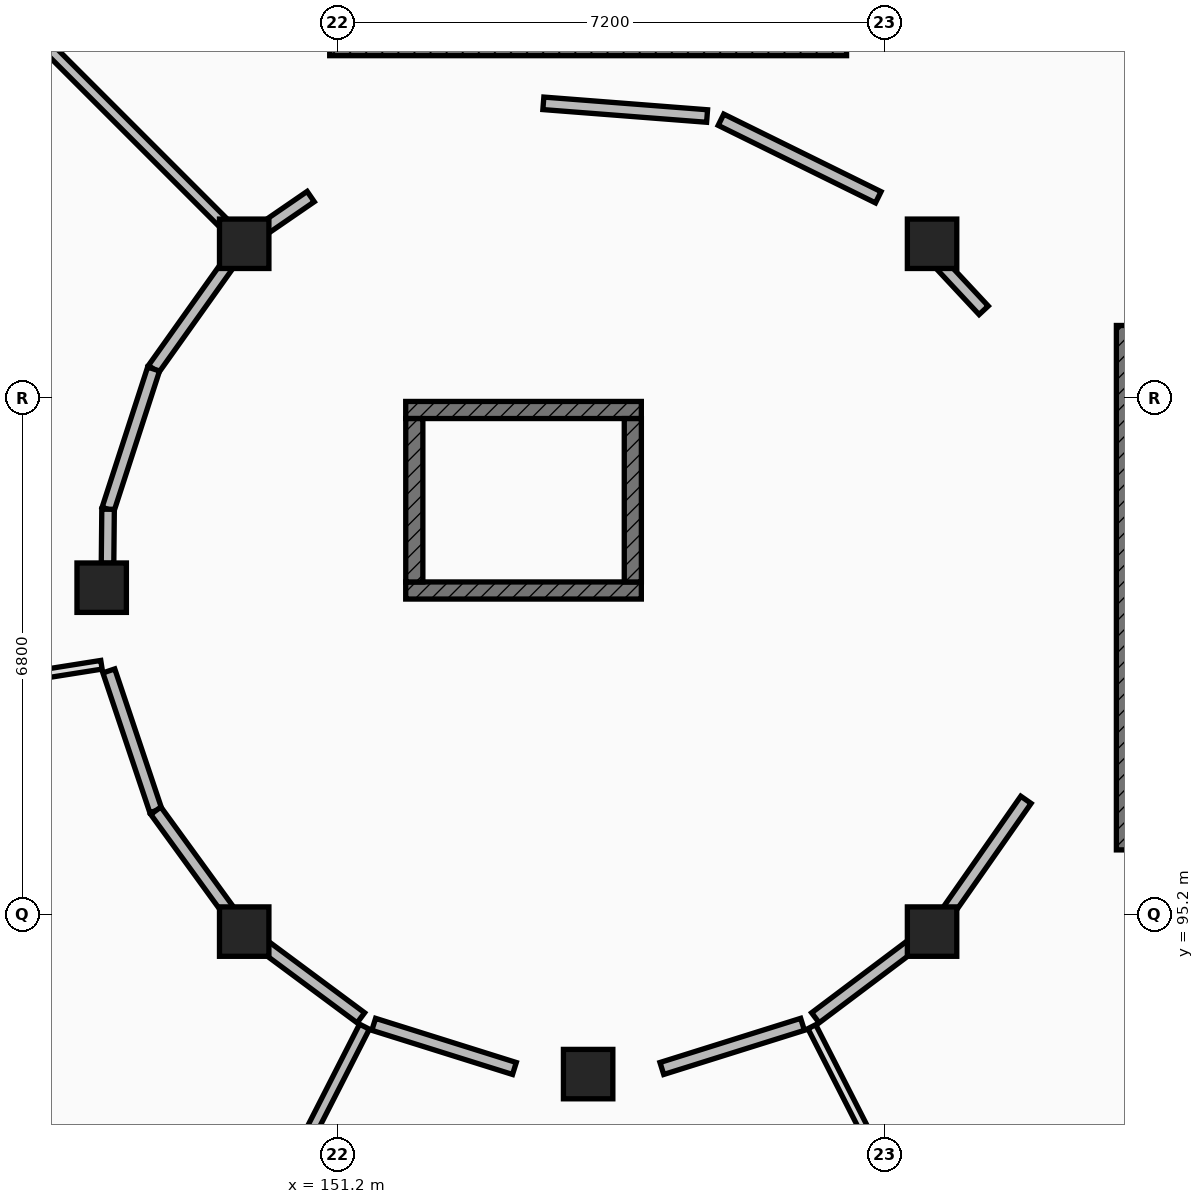
"""IFC4 building model, lengths in metres.
Left out: names, types, materials, properties, quantities, classifications, styles, units other than length and angle.
Written with IfcOpenShell. Run it as: python <this file> out.ifc"""

import sys

from ifc_helpers import new_model, si_unit, direction, frame, frame_2d, origin, origin_2d, place, context, subcontext, project, spatial, rectangle, extrude, element, fill, save


model = new_model("IFC4")
c1 = context("Model", 3, precision=1e-05, world=origin(), true_north=direction((0.0, 1.0)))
c2 = subcontext(c1, "Body", "Model", "MODEL_VIEW")
j1 = project(units=[si_unit("LENGTHUNIT", "METRE"), si_unit("PLANEANGLEUNIT", "RADIAN")], contexts=[c1])
p1 = place(None, origin())
s1 = spatial("IfcSite", under=j1, at=p1, CompositionType="ELEMENT")
p2 = place(p1, origin())
s2 = spatial("IfcBuilding", under=s1, at=p2, CompositionType="ELEMENT")
p3 = place(p2, frame((0.0, 0.0, -4.55)))
s3 = spatial("IfcBuildingStorey", under=s2, at=p3, CompositionType="ELEMENT", Elevation=-4.55)
for number, where, z_axis, x_axis in (
    (1, (159.025, 104.025, 0.0), (0.0, 0.0, 1.0), (1.0, 0.0, 0.0)),
    (2, (149.975, 104.025, 0.0), (0.0, 0.0, 1.0), (1.0, 0.0, 0.0)),
    (3, (148.1, 99.5, 0.0), (0.0, 0.0, 1.0), (1.0, 0.0, 0.0)),
    (4, (149.975, 94.975, 0.0), (0.0, 0.0, 1.0), (1.0, 0.0, 0.0)),
    (5, (154.5, 93.1, 0.0), (0.0, 0.0, 1.0), (1.0, 0.0, 0.0)),
    (6, (159.025, 94.975, 0.0), (0.0, 0.0, 1.0), (1.0, 0.0, 0.0)),
):
    element("IfcColumn", number, at=place(p3, frame(where, z_axis=z_axis, x_axis=x_axis)), inside=s3, PredefinedType="COLUMN", context=c2, shape_type="SweptSolid", body=[
        extrude(rectangle(XDim=0.65, YDim=0.65, at=origin_2d()), origin(), (0.0, 0.0, 1.0), 4.55),
    ])
p4 = place(p3, frame((161.575, 102.95, 0.0), z_axis=(0.0, 0.0, 1.0), x_axis=(0.0, -1.0, 0.0)))
e7 = element("IfcWall", 7, at=p4, inside=s3, PredefinedType="SHEAR", context=c2, shape_type="SweptSolid", body=[
    extrude(rectangle(XDim=6.9, YDim=0.25, at=frame_2d((3.45, 0.0))), origin(), (0.0, 0.0, 1.0), 4.148),
])
p5 = place(p4, frame((0.43, 0.0, 0.0)))
e8 = element("IfcOpeningElement", 8, at=p5, cuts=e7, PredefinedType="OPENING", context=c2, shape_type="SweptSolid", body=[
    extrude(rectangle(XDim=1.1, YDim=2.15, at=frame_2d((0.55, 1.075))), frame((0.0, 0.135, 0.0), z_axis=(0.0, -1.0, 0.0), x_axis=(1.0, 0.0, 0.0)), (0.0, 0.0, 1.0), 0.27),
])
p6 = place(p3, frame((151.1, 106.6, 0.0), z_axis=(0.0, 0.0, 1.0), x_axis=(1.0, 0.0, 0.0)))
e9 = element("IfcWall", 9, at=p6, inside=s3, PredefinedType="SHEAR", context=c2, shape_type="SweptSolid", body=[
    extrude(rectangle(XDim=6.8, YDim=0.2, at=frame_2d((3.4, 0.0))), origin(), (0.0, 0.0, 1.0), 4.148),
])
p7 = place(p6, frame((0.38, 0.0, 0.0)))
e10 = element("IfcOpeningElement", 10, at=p7, cuts=e9, PredefinedType="OPENING", context=c2, shape_type="SweptSolid", body=[
    extrude(rectangle(XDim=1.05, YDim=2.15, at=frame_2d((0.525, 1.075))), frame((0.0, 0.11, 0.0), z_axis=(0.0, -1.0, 0.0), x_axis=(1.0, 0.0, 0.0)), (0.0, 0.0, 1.0), 0.22),
])
p8 = place(p3, frame((152.1, 99.463, 0.0), z_axis=(0.0, 0.0, 1.0), x_axis=(1.0, 0.0, 0.0)))
e11 = element("IfcWall", 11, at=p8, inside=s3, PredefinedType="SHEAR", context=c2, shape_type="SweptSolid", body=[
    extrude(rectangle(XDim=3.1, YDim=0.225, at=frame_2d((1.55, 0.0))), origin(), (0.0, 0.0, 1.0), 4.148),
])
p9 = place(p8, frame((0.9, 0.0, 0.0)))
e12 = element("IfcOpeningElement", 12, at=p9, cuts=e11, PredefinedType="OPENING", context=c2, shape_type="SweptSolid", body=[
    extrude(rectangle(XDim=1.3, YDim=2.2, at=frame_2d((0.65, 1.1))), frame((0.0, 0.123, 0.0), z_axis=(0.0, -1.0, 0.0), x_axis=(1.0, 0.0, 0.0)), (0.0, 0.0, 1.0), 0.245),
])
p10 = place(p3, frame((152.1, 101.838, 0.0), z_axis=(0.0, 0.0, 1.0), x_axis=(1.0, 0.0, 0.0)))
e13 = element("IfcWall", 13, at=p10, inside=s3, PredefinedType="SHEAR", context=c2, shape_type="SweptSolid", body=[
    extrude(rectangle(XDim=3.1, YDim=0.225, at=frame_2d((1.55, 0.0))), origin(), (0.0, 0.0, 1.0), 4.148),
])
for number, where, z_axis, x_axis in (
    (14, (152.213, 99.575, 0.0), (0.0, 0.0, 1.0), (0.0, 1.0, 0.0)),
    (15, (155.088, 99.575, 0.0), (0.0, 0.0, 1.0), (0.0, 1.0, 0.0)),
):
    element("IfcWall", number, at=place(p3, frame(where, z_axis=z_axis, x_axis=x_axis)), inside=s3, PredefinedType="SHEAR", context=c2, shape_type="SweptSolid", body=[
        extrude(rectangle(XDim=2.15, YDim=0.225, at=frame_2d((1.075, 0.0))), origin(), (0.0, 0.0, 1.0), 4.148),
    ])
p11 = place(p3, frame((149.916, 104.084, 0.0), z_axis=(0.0, 0.0, 1.0), x_axis=(-0.707106781187, 0.707106781187, 0.0)))
e16 = element("IfcWall", 16, at=p11, inside=s3, PredefinedType="PARTITIONING", context=c2, shape_type="SweptSolid", body=[
    extrude(rectangle(XDim=5.316, YDim=0.145, at=frame_2d((2.658, 0.0))), origin(), (0.0, 0.0, 1.0), 3.323),
])
p12 = place(p3, frame((148.097, 98.486, 0.0), z_axis=(0.0, 0.0, 1.0), x_axis=(-0.98768185006, -0.156475439167, 0.0)))
e17 = element("IfcWall", 17, at=p12, inside=s3, PredefinedType="PARTITIONING", context=c2, shape_type="SweptSolid", body=[
    extrude(rectangle(XDim=5.28, YDim=0.115, at=frame_2d((2.64, 0.0))), origin(), (0.0, 0.0, 1.0), 3.323),
])
p13 = place(p3, frame((151.557, 93.724, 0.0), z_axis=(0.0, 0.0, 1.0), x_axis=(-0.454011967175, -0.890995585658, 0.0)))
e18 = element("IfcWall", 18, at=p13, inside=s3, PredefinedType="PARTITIONING", context=c2, shape_type="SweptSolid", body=[
    extrude(rectangle(XDim=5.262, YDim=0.145, at=frame_2d((2.631, 0.0))), origin(), (0.0, 0.0, 1.0), 3.323),
])
p14 = place(p3, frame((157.443, 93.724, 0.0), z_axis=(0.0, 0.0, 1.0), x_axis=(0.454011967175, -0.890995585658, 0.0)))
e19 = element("IfcWall", 19, at=p14, inside=s3, PredefinedType="PARTITIONING", context=c2, shape_type="SweptSolid", body=[
    extrude(rectangle(XDim=5.262, YDim=0.115, at=frame_2d((2.631, 0.0))), origin(), (0.0, 0.0, 1.0), 3.323),
])
p15 = place(p3, frame((159.704, 103.15, 0.0), z_axis=(0.0, 0.0, 1.0), x_axis=(-0.681921292567, 0.73142556063, 0.0)))
e20 = element("IfcWall", 20, at=p15, inside=s3, PredefinedType="PARTITIONING", context=c2, shape_type="SweptSolid", body=[
    extrude(rectangle(XDim=0.789, YDim=0.165, at=frame_2d((0.395, 0.0))), origin(), (0.0, 0.0, 1.0), 3.323),
])
p16 = place(p3, frame((158.317, 104.637, 0.0), z_axis=(0.0, 0.0, 1.0), x_axis=(-0.896911127032, 0.442210843609, 0.0)))
e21 = element("IfcWall", 21, at=p16, inside=s3, PredefinedType="PARTITIONING", context=c2, shape_type="SweptSolid", body=[
    extrude(rectangle(XDim=2.307, YDim=0.165, at=frame_2d((1.153, 0.0))), origin(), (0.0, 0.0, 1.0), 3.323),
])
p17 = place(p16, frame((0.688, 0.0, 0.0)))
e22 = element("IfcOpeningElement", 22, at=p17, cuts=e21, PredefinedType="OPENING", context=c2, shape_type="SweptSolid", body=[
    extrude(rectangle(XDim=0.93, YDim=2.18, at=frame_2d((0.465, 1.09))), frame((0.0, 0.093, 0.0), z_axis=(0.0, -1.0, 0.0), x_axis=(1.0, 0.0, 0.0)), (0.0, 0.0, 1.0), 0.185),
])
p18 = place(p3, frame((156.065, 105.706, 0.0), z_axis=(0.0, 0.0, 1.0), x_axis=(-0.997008442081, 0.077292731994, 0.0)))
e23 = element("IfcWall", 23, at=p18, inside=s3, PredefinedType="PARTITIONING", context=c2, shape_type="SweptSolid", body=[
    extrude(rectangle(XDim=2.16, YDim=0.165, at=frame_2d((1.08, 0.0))), origin(), (0.0, 0.0, 1.0), 3.323),
])
p19 = place(p3, frame((150.85, 104.646, 0.0), z_axis=(0.0, 0.0, 1.0), x_axis=(-0.824396202601, -0.566013163395, 0.0)))
e24 = element("IfcWall", 24, at=p19, inside=s3, PredefinedType="PARTITIONING", context=c2, shape_type="SweptSolid", body=[
    extrude(rectangle(XDim=0.744, YDim=0.165, at=frame_2d((0.372, 0.0))), origin(), (0.0, 0.0, 1.0), 3.323),
])
p20 = place(p3, frame((149.771, 103.766, 0.0), z_axis=(0.0, 0.0, 1.0), x_axis=(-0.579597764365, -0.814902712932, 0.0)))
e25 = element("IfcWall", 25, at=p20, inside=s3, PredefinedType="PARTITIONING", context=c2, shape_type="SweptSolid", body=[
    extrude(rectangle(XDim=1.705, YDim=0.165, at=frame_2d((0.852, 0.0))), origin(), (0.0, 0.0, 1.0), 3.323),
])
p21 = place(p20, frame((0.357, 0.0, 0.0)))
e26 = element("IfcOpeningElement", 26, at=p21, cuts=e25, PredefinedType="OPENING", context=c2, shape_type="SweptSolid", body=[
    extrude(rectangle(XDim=0.99, YDim=2.22, at=frame_2d((0.495, 1.11))), frame((0.0, 0.093, 0.0), z_axis=(0.0, -1.0, 0.0), x_axis=(1.0, 0.0, 0.0)), (0.0, 0.0, 1.0), 0.185),
])
p22 = place(p3, frame((148.783, 102.377, 0.0), z_axis=(0.0, 0.0, 1.0), x_axis=(-0.308741690047, -0.951145924045, 0.0)))
e27 = element("IfcWall", 27, at=p22, inside=s3, PredefinedType="PARTITIONING", context=c2, shape_type="SweptSolid", body=[
    extrude(rectangle(XDim=1.94, YDim=0.165, at=frame_2d((0.97, 0.0))), origin(), (0.0, 0.0, 1.0), 3.323),
])
p23 = place(p3, frame((148.184, 100.532, 0.0), z_axis=(0.0, 0.0, 1.0), x_axis=(-0.009958297401, -0.999950414927, 0.0)))
e28 = element("IfcWall", 28, at=p23, inside=s3, PredefinedType="PARTITIONING", context=c2, shape_type="SweptSolid", body=[
    extrude(rectangle(XDim=0.711, YDim=0.165, at=frame_2d((0.355, 0.0))), origin(), (0.0, 0.0, 1.0), 3.323),
])
p24 = place(p3, frame((148.194, 98.405, 0.0), z_axis=(0.0, 0.0, 1.0), x_axis=(0.318491919822, -0.947925575669, 0.0)))
e29 = element("IfcWall", 29, at=p24, inside=s3, PredefinedType="PARTITIONING", context=c2, shape_type="SweptSolid", body=[
    extrude(rectangle(XDim=1.94, YDim=0.165, at=frame_2d((0.97, 0.0))), origin(), (0.0, 0.0, 1.0), 3.323),
])
p25 = place(p24, frame((0.495, 0.0, 0.0)))
e30 = element("IfcOpeningElement", 30, at=p25, cuts=e29, PredefinedType="OPENING", context=c2, shape_type="SweptSolid", body=[
    extrude(rectangle(XDim=0.95, YDim=2.16, at=frame_2d((0.475, 1.08))), frame((0.0, 0.093, 0.0), z_axis=(0.0, -1.0, 0.0), x_axis=(1.0, 0.0, 0.0)), (0.0, 0.0, 1.0), 0.185),
])
p26 = place(p3, frame((148.812, 96.566, 0.0), z_axis=(0.0, 0.0, 1.0), x_axis=(0.587915215661, -0.80892255451, 0.0)))
e31 = element("IfcWall", 31, at=p26, inside=s3, PredefinedType="PARTITIONING", context=c2, shape_type="SweptSolid", body=[
    extrude(rectangle(XDim=1.642, YDim=0.165, at=frame_2d((0.821, 0.0))), origin(), (0.0, 0.0, 1.0), 3.323),
])
p27 = place(p3, frame((150.242, 94.782, 0.0), z_axis=(0.0, 0.0, 1.0), x_axis=(0.803069387245, -0.595885525307, 0.0)))
e32 = element("IfcWall", 32, at=p27, inside=s3, PredefinedType="PARTITIONING", context=c2, shape_type="SweptSolid", body=[
    extrude(rectangle(XDim=1.579, YDim=0.165, at=frame_2d((0.79, 0.0))), origin(), (0.0, 0.0, 1.0), 3.323),
])
p28 = place(p3, frame((151.679, 93.755, 0.0), z_axis=(0.0, 0.0, 1.0), x_axis=(0.95413450606, -0.29937826298, 0.0)))
e33 = element("IfcWall", 33, at=p28, inside=s3, PredefinedType="PARTITIONING", context=c2, shape_type="SweptSolid", body=[
    extrude(rectangle(XDim=1.94, YDim=0.165, at=frame_2d((0.97, 0.0))), origin(), (0.0, 0.0, 1.0), 3.323),
])
p29 = place(p28, frame((0.38, 0.0, 0.0)))
e34 = element("IfcOpeningElement", 34, at=p29, cuts=e33, PredefinedType="OPENING", context=c2, shape_type="SweptSolid", body=[
    extrude(rectangle(XDim=1.18, YDim=2.2, at=frame_2d((0.59, 1.1))), frame((0.0, 0.093, 0.0), z_axis=(0.0, -1.0, 0.0), x_axis=(1.0, 0.0, 0.0)), (0.0, 0.0, 1.0), 0.185),
])
p30 = place(p3, frame((155.47, 93.174, 0.0), z_axis=(0.0, 0.0, 1.0), x_axis=(0.95413450606, 0.29937826298, 0.0)))
e35 = element("IfcWall", 35, at=p30, inside=s3, PredefinedType="PARTITIONING", context=c2, shape_type="SweptSolid", body=[
    extrude(rectangle(XDim=1.94, YDim=0.165, at=frame_2d((0.97, 0.0))), origin(), (0.0, 0.0, 1.0), 3.323),
])
p31 = place(p3, frame((157.49, 93.841, 0.0), z_axis=(0.0, 0.0, 1.0), x_axis=(0.799238619114, 0.60101383488, 0.0)))
e36 = element("IfcWall", 36, at=p31, inside=s3, PredefinedType="PARTITIONING", context=c2, shape_type="SweptSolid", body=[
    extrude(rectangle(XDim=1.579, YDim=0.165, at=frame_2d((0.79, 0.0))), origin(), (0.0, 0.0, 1.0), 3.323),
])
p32 = place(p31, frame((0.314, 0.0, 0.0)))
e37 = element("IfcOpeningElement", 37, at=p32, cuts=e36, PredefinedType="OPENING", context=c2, shape_type="SweptSolid", body=[
    extrude(rectangle(XDim=0.95, YDim=2.16, at=frame_2d((0.475, 1.08))), frame((0.0, 0.093, 0.0), z_axis=(0.0, -1.0, 0.0), x_axis=(1.0, 0.0, 0.0)), (0.0, 0.0, 1.0), 0.185),
])
p33 = place(p3, frame((159.229, 95.234, 0.0), z_axis=(0.0, 0.0, 1.0), x_axis=(0.572879511522, 0.819639594747, 0.0)))
e38 = element("IfcWall", 38, at=p33, inside=s3, PredefinedType="PARTITIONING", context=c2, shape_type="SweptSolid", body=[
    extrude(rectangle(XDim=1.8, YDim=0.165, at=frame_2d((0.9, 0.0))), origin(), (0.0, 0.0, 1.0), 3.323),
])
p34 = place(p5, origin())
e39 = element("IfcDoor", 39, at=p34, inside=s3, OperationType="SINGLE_SWING_LEFT", PredefinedType="DOOR", context=c2, shape_type="SweptSolid", body=[
    extrude(rectangle(XDim=1.1, YDim=2.15, at=frame_2d((0.55, 1.075))), frame((0.0, 0.025, 0.0), z_axis=(0.0, -1.0, 0.0), x_axis=(1.0, 0.0, 0.0)), (0.0, 0.0, 1.0), 0.05),
])
fill(e8, e39)
p35 = place(p9, origin())
e40 = element("IfcDoor", 40, at=p35, inside=s3, OperationType="DOUBLE_DOOR_SLIDING", PredefinedType="DOOR", context=c2, shape_type="SweptSolid", body=[
    extrude(rectangle(XDim=1.3, YDim=2.2, at=frame_2d((0.65, 1.1))), frame((0.0, 0.025, 0.0), z_axis=(0.0, -1.0, 0.0), x_axis=(1.0, 0.0, 0.0)), (0.0, 0.0, 1.0), 0.05),
])
fill(e12, e40)
p36 = place(p17, origin())
e41 = element("IfcDoor", 41, at=p36, inside=s3, OperationType="SINGLE_SWING_LEFT", PredefinedType="DOOR", context=c2, shape_type="SweptSolid", body=[
    extrude(rectangle(XDim=0.93, YDim=2.18, at=frame_2d((0.465, 1.09))), frame((0.0, 0.025, 0.0), z_axis=(0.0, -1.0, 0.0), x_axis=(1.0, 0.0, 0.0)), (0.0, 0.0, 1.0), 0.05),
])
fill(e22, e41)
p37 = place(p21, origin())
e42 = element("IfcDoor", 42, at=p37, inside=s3, OperationType="SINGLE_SWING_RIGHT", PredefinedType="DOOR", context=c2, shape_type="SweptSolid", body=[
    extrude(rectangle(XDim=0.99, YDim=2.22, at=frame_2d((0.495, 1.11))), frame((0.0, 0.025, 0.0), z_axis=(0.0, -1.0, 0.0), x_axis=(1.0, 0.0, 0.0)), (0.0, 0.0, 1.0), 0.05),
])
fill(e26, e42)
p38 = place(p25, origin())
e43 = element("IfcDoor", 43, at=p38, inside=s3, OperationType="SINGLE_SWING_LEFT", PredefinedType="DOOR", context=c2, shape_type="SweptSolid", body=[
    extrude(rectangle(XDim=0.95, YDim=2.16, at=frame_2d((0.475, 1.08))), frame((0.0, 0.025, 0.0), z_axis=(0.0, -1.0, 0.0), x_axis=(1.0, 0.0, 0.0)), (0.0, 0.0, 1.0), 0.05),
])
fill(e30, e43)
p39 = place(p29, origin())
e44 = element("IfcDoor", 44, at=p39, inside=s3, OperationType="SINGLE_SWING_RIGHT", PredefinedType="DOOR", context=c2, shape_type="SweptSolid", body=[
    extrude(rectangle(XDim=1.18, YDim=2.2, at=frame_2d((0.59, 1.1))), frame((0.0, 0.025, 0.0), z_axis=(0.0, -1.0, 0.0), x_axis=(1.0, 0.0, 0.0)), (0.0, 0.0, 1.0), 0.05),
])
fill(e34, e44)
p40 = place(p32, origin())
e45 = element("IfcDoor", 45, at=p40, inside=s3, OperationType="SINGLE_SWING_LEFT", PredefinedType="DOOR", context=c2, shape_type="SweptSolid", body=[
    extrude(rectangle(XDim=0.95, YDim=2.16, at=frame_2d((0.475, 1.08))), frame((0.0, 0.025, 0.0), z_axis=(0.0, -1.0, 0.0), x_axis=(1.0, 0.0, 0.0)), (0.0, 0.0, 1.0), 0.05),
])
fill(e37, e45)
save(model, sys.argv[1])
